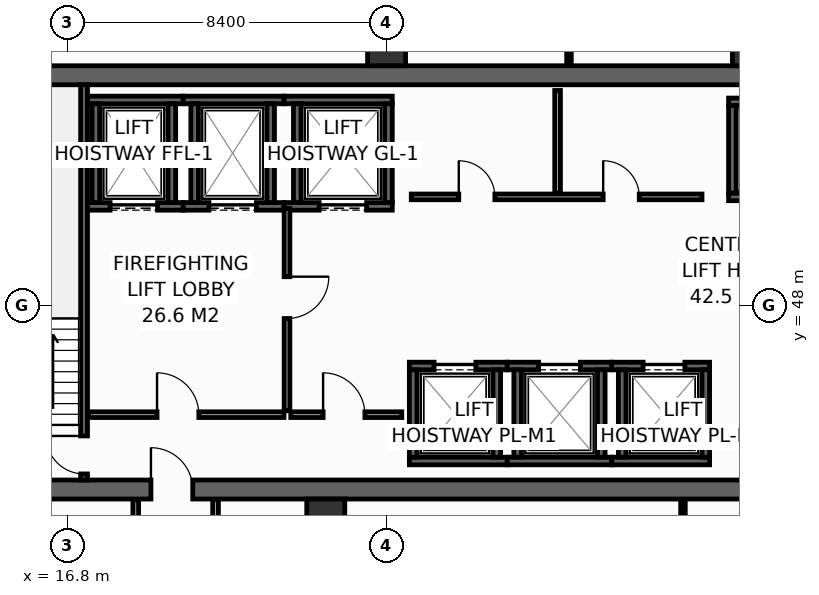
"""IFC4 building model, lengths in metres.
Left out: names, types, materials, properties, quantities, classifications, styles, units other than length and angle.
Written with IfcOpenShell. Run it as: python <this file> out.ifc"""

import sys

from ifc_helpers import new_model, si_unit, direction, frame, frame_2d, origin, origin_2d, place, context, subcontext, project, spatial, rectangle, hollow_rectangle, extrude, element, fill, save


model = new_model("IFC4")
c1 = context("Model", 3, precision=1e-05, world=origin(), true_north=direction((0.0, 1.0)))
c2 = subcontext(c1, "Body", "Model", "MODEL_VIEW")
j1 = project(units=[si_unit("LENGTHUNIT", "METRE"), si_unit("PLANEANGLEUNIT", "RADIAN")], contexts=[c1])
p1 = place(None, origin())
s1 = spatial("IfcSite", under=j1, at=p1, CompositionType="ELEMENT")
p2 = place(p1, origin())
s2 = spatial("IfcBuilding", under=s1, at=p2, CompositionType="ELEMENT")
p3 = place(p2, frame((0.0, 0.0, 163.8)))
s3 = spatial("IfcBuildingStorey", under=s2, at=p3, CompositionType="ELEMENT", Elevation=163.8)
p4 = place(p3, frame((13.6, 43.15, 0.0), z_axis=(0.0, 0.0, 1.0), x_axis=(1.0, 0.0, 0.0)))
e1 = element("IfcWall", 1, at=p4, inside=s3, PredefinedType="SHEAR", context=c2, shape_type="SweptSolid", body=[
    extrude(rectangle(XDim=32.7, YDim=0.5, at=frame_2d((16.35, 0.0))), origin(), (0.0, 0.0, 1.0), 3.55),
])
p5 = place(p4, frame((5.4, 0.0, 0.0)))
e2 = element("IfcOpeningElement", 2, at=p5, cuts=e1, PredefinedType="OPENING", context=c2, shape_type="SweptSolid", body=[
    extrude(rectangle(XDim=1.1, YDim=2.15, at=frame_2d((0.55, 1.075))), frame((0.0, 0.26, 0.0), z_axis=(0.0, -1.0, 0.0), x_axis=(1.0, 0.0, 0.0)), (0.0, 0.0, 1.0), 0.52),
])
p6 = place(p4, frame((25.6, 0.0, 0.0)))
e3 = element("IfcOpeningElement", 3, at=p6, cuts=e1, PredefinedType="OPENING", context=c2, shape_type="SweptSolid", body=[
    extrude(rectangle(XDim=1.1, YDim=2.15, at=frame_2d((0.55, 1.075))), frame((0.0, 0.26, 0.0), z_axis=(0.0, -1.0, 0.0), x_axis=(1.0, 0.0, 0.0)), (0.0, 0.0, 1.0), 0.52),
])
p7 = place(p3, frame((13.6, 54.05, 0.0), z_axis=(0.0, 0.0, 1.0), x_axis=(1.0, 0.0, 0.0)))
e4 = element("IfcWall", 4, at=p7, inside=s3, PredefinedType="SHEAR", context=c2, shape_type="SweptSolid", body=[
    extrude(rectangle(XDim=32.7, YDim=0.5, at=frame_2d((16.35, 0.0))), origin(), (0.0, 0.0, 1.0), 3.55),
])
for number, where, z_axis, x_axis in (
    (5, (25.2, 54.8, 0.0), (0.0, 0.0, 1.0), (1.0, 0.0, 0.0)),
    (6, (34.8, 54.8, 0.0), (0.0, 0.0, 1.0), (1.0, 0.0, 0.0)),
    (7, (23.6, 42.4, 0.0), (0.0, 0.0, 1.0), (1.0, 0.0, 0.0)),
):
    element("IfcColumn", number, at=place(p3, frame(where, z_axis=z_axis, x_axis=x_axis)), inside=s3, PredefinedType="COLUMN", context=c2, shape_type="SweptSolid", body=[
        extrude(hollow_rectangle(XDim=1.0, YDim=1.0, WallThickness=0.045, at=origin_2d()), origin(), (0.0, 0.0, 1.0), 3.8),
    ])
p8 = place(p3, frame((17.33, 50.6, 0.0), z_axis=(0.0, 0.0, 1.0), x_axis=(1.0, 0.0, 0.0)))
e8 = element("IfcWall", 8, at=p8, inside=s3, PredefinedType="SHEAR", context=c2, shape_type="SweptSolid", body=[
    extrude(rectangle(XDim=2.52, YDim=0.2, at=frame_2d((1.26, 0.0))), origin(), (0.0, 0.0, 1.0), 3.55),
])
p9 = place(p8, frame((0.595, 0.0, 0.0)))
e9 = element("IfcOpeningElement", 9, at=p9, cuts=e8, PredefinedType="OPENING", context=c2, shape_type="SweptSolid", body=[
    extrude(rectangle(XDim=1.25, YDim=2.3, at=frame_2d((0.625, 1.15))), frame((0.0, 0.11, 0.0), z_axis=(0.0, -1.0, 0.0), x_axis=(1.0, 0.0, 0.0)), (0.0, 0.0, 1.0), 0.22),
])
p10 = place(p3, frame((17.33, 53.4, 0.0), z_axis=(0.0, 0.0, 1.0), x_axis=(1.0, 0.0, 0.0)))
e10 = element("IfcWall", 10, at=p10, inside=s3, PredefinedType="SHEAR", context=c2, shape_type="SweptSolid", body=[
    extrude(rectangle(XDim=2.52, YDim=0.2, at=frame_2d((1.26, 0.0))), origin(), (0.0, 0.0, 1.0), 3.55),
])
for number, where, z_axis, x_axis in (
    (11, (17.55, 50.7, 0.0), (0.0, 0.0, 1.0), (0.0, 1.0, 0.0)),
    (12, (19.55, 50.7, 0.0), (0.0, 0.0, 1.0), (0.0, 1.0, 0.0)),
):
    element("IfcWall", number, at=place(p3, frame(where, z_axis=z_axis, x_axis=x_axis)), inside=s3, PredefinedType="SHEAR", context=c2, shape_type="SweptSolid", body=[
        extrude(rectangle(XDim=2.6, YDim=0.2, at=frame_2d((1.3, 0.0))), origin(), (0.0, 0.0, 1.0), 3.55),
    ])
p11 = place(p3, frame((19.85, 50.6, 0.0), z_axis=(0.0, 0.0, 1.0), x_axis=(1.0, 0.0, 0.0)))
e13 = element("IfcWall", 13, at=p11, inside=s3, PredefinedType="SHEAR", context=c2, shape_type="SweptSolid", body=[
    extrude(rectangle(XDim=2.65, YDim=0.2, at=frame_2d((1.325, 0.0))), origin(), (0.0, 0.0, 1.0), 3.55),
])
p12 = place(p11, frame((0.675, 0.0, 0.0)))
e14 = element("IfcOpeningElement", 14, at=p12, cuts=e13, PredefinedType="OPENING", context=c2, shape_type="SweptSolid", body=[
    extrude(rectangle(XDim=1.25, YDim=2.3, at=frame_2d((0.625, 1.15))), frame((0.0, 0.11, 0.0), z_axis=(0.0, -1.0, 0.0), x_axis=(1.0, 0.0, 0.0)), (0.0, 0.0, 1.0), 0.22),
])
p13 = place(p3, frame((19.85, 53.4, 0.0), z_axis=(0.0, 0.0, 1.0), x_axis=(1.0, 0.0, 0.0)))
e15 = element("IfcWall", 15, at=p13, inside=s3, PredefinedType="SHEAR", context=c2, shape_type="SweptSolid", body=[
    extrude(rectangle(XDim=2.65, YDim=0.2, at=frame_2d((1.325, 0.0))), origin(), (0.0, 0.0, 1.0), 3.55),
])
for number, where, z_axis, x_axis in (
    (16, (20.15, 50.7, 0.0), (0.0, 0.0, 1.0), (0.0, 1.0, 0.0)),
    (17, (22.15, 50.7, 0.0), (0.0, 0.0, 1.0), (0.0, 1.0, 0.0)),
):
    element("IfcWall", number, at=place(p3, frame(where, z_axis=z_axis, x_axis=x_axis)), inside=s3, PredefinedType="SHEAR", context=c2, shape_type="SweptSolid", body=[
        extrude(rectangle(XDim=2.6, YDim=0.2, at=frame_2d((1.3, 0.0))), origin(), (0.0, 0.0, 1.0), 3.55),
    ])
p14 = place(p3, frame((22.5, 50.6, 0.0), z_axis=(0.0, 0.0, 1.0), x_axis=(1.0, 0.0, 0.0)))
e18 = element("IfcWall", 18, at=p14, inside=s3, PredefinedType="SHEAR", context=c2, shape_type="SweptSolid", body=[
    extrude(rectangle(XDim=2.85, YDim=0.2, at=frame_2d((1.425, 0.0))), origin(), (0.0, 0.0, 1.0), 3.55),
])
p15 = place(p14, frame((0.925, 0.0, 0.0)))
e19 = element("IfcOpeningElement", 19, at=p15, cuts=e18, PredefinedType="OPENING", context=c2, shape_type="SweptSolid", body=[
    extrude(rectangle(XDim=1.25, YDim=2.3, at=frame_2d((0.625, 1.15))), frame((0.0, 0.11, 0.0), z_axis=(0.0, -1.0, 0.0), x_axis=(1.0, 0.0, 0.0)), (0.0, 0.0, 1.0), 0.22),
])
p16 = place(p3, frame((22.5, 53.4, 0.0), z_axis=(0.0, 0.0, 1.0), x_axis=(1.0, 0.0, 0.0)))
e20 = element("IfcWall", 20, at=p16, inside=s3, PredefinedType="SHEAR", context=c2, shape_type="SweptSolid", body=[
    extrude(rectangle(XDim=2.85, YDim=0.2, at=frame_2d((1.425, 0.0))), origin(), (0.0, 0.0, 1.0), 3.55),
])
for number, where, z_axis, x_axis in (
    (21, (22.85, 50.7, 0.0), (0.0, 0.0, 1.0), (0.0, 1.0, 0.0)),
    (22, (25.25, 50.7, 0.0), (0.0, 0.0, 1.0), (0.0, 1.0, 0.0)),
):
    element("IfcWall", number, at=place(p3, frame(where, z_axis=z_axis, x_axis=x_axis)), inside=s3, PredefinedType="SHEAR", context=c2, shape_type="SweptSolid", body=[
        extrude(rectangle(XDim=2.6, YDim=0.2, at=frame_2d((1.3, 0.0))), origin(), (0.0, 0.0, 1.0), 3.55),
    ])
p17 = place(p3, frame((25.8, 43.9, 0.0), z_axis=(0.0, 0.0, 1.0), x_axis=(1.0, 0.0, 0.0)))
e23 = element("IfcWall", 23, at=p17, inside=s3, PredefinedType="SHEAR", context=c2, shape_type="SweptSolid", body=[
    extrude(rectangle(XDim=2.575, YDim=0.2, at=frame_2d((1.288, 0.0))), origin(), (0.0, 0.0, 1.0), 3.55),
])
p18 = place(p3, frame((25.8, 46.4, 0.0), z_axis=(0.0, 0.0, 1.0), x_axis=(1.0, 0.0, 0.0)))
e24 = element("IfcWall", 24, at=p18, inside=s3, PredefinedType="SHEAR", context=c2, shape_type="SweptSolid", body=[
    extrude(rectangle(XDim=2.575, YDim=0.2, at=frame_2d((1.288, 0.0))), origin(), (0.0, 0.0, 1.0), 3.55),
])
p19 = place(p18, frame((0.65, 0.0, 0.0)))
e25 = element("IfcOpeningElement", 25, at=p19, cuts=e24, PredefinedType="OPENING", context=c2, shape_type="SweptSolid", body=[
    extrude(rectangle(XDim=1.1, YDim=2.2, at=frame_2d((0.55, 1.1))), frame((0.0, 0.11, 0.0), z_axis=(0.0, -1.0, 0.0), x_axis=(1.0, 0.0, 0.0)), (0.0, 0.0, 1.0), 0.22),
])
for number, where, z_axis, x_axis in (
    (26, (25.9, 44.0, 0.0), (0.0, 0.0, 1.0), (0.0, 1.0, 0.0)),
    (27, (28.1, 44.0, 0.0), (0.0, 0.0, 1.0), (0.0, 1.0, 0.0)),
):
    element("IfcWall", number, at=place(p3, frame(where, z_axis=z_axis, x_axis=x_axis)), inside=s3, PredefinedType="SHEAR", context=c2, shape_type="SweptSolid", body=[
        extrude(rectangle(XDim=2.3, YDim=0.2, at=frame_2d((1.15, 0.0))), origin(), (0.0, 0.0, 1.0), 3.55),
    ])
p20 = place(p3, frame((28.375, 43.9, 0.0), z_axis=(0.0, 0.0, 1.0), x_axis=(1.0, 0.0, 0.0)))
e28 = element("IfcWall", 28, at=p20, inside=s3, PredefinedType="SHEAR", context=c2, shape_type="SweptSolid", body=[
    extrude(rectangle(XDim=2.75, YDim=0.2, at=frame_2d((1.375, 0.0))), origin(), (0.0, 0.0, 1.0), 3.55),
])
p21 = place(p3, frame((28.375, 46.4, 0.0), z_axis=(0.0, 0.0, 1.0), x_axis=(1.0, 0.0, 0.0)))
e29 = element("IfcWall", 29, at=p21, inside=s3, PredefinedType="SHEAR", context=c2, shape_type="SweptSolid", body=[
    extrude(rectangle(XDim=2.75, YDim=0.2, at=frame_2d((1.375, 0.0))), origin(), (0.0, 0.0, 1.0), 3.55),
])
p22 = place(p21, frame((0.825, 0.0, 0.0)))
e30 = element("IfcOpeningElement", 30, at=p22, cuts=e29, PredefinedType="OPENING", context=c2, shape_type="SweptSolid", body=[
    extrude(rectangle(XDim=1.1, YDim=2.2, at=frame_2d((0.55, 1.1))), frame((0.0, 0.11, 0.0), z_axis=(0.0, -1.0, 0.0), x_axis=(1.0, 0.0, 0.0)), (0.0, 0.0, 1.0), 0.22),
])
for number, where, z_axis, x_axis in (
    (31, (28.65, 44.0, 0.0), (0.0, 0.0, 1.0), (0.0, 1.0, 0.0)),
    (32, (30.85, 44.0, 0.0), (0.0, 0.0, 1.0), (0.0, 1.0, 0.0)),
):
    element("IfcWall", number, at=place(p3, frame(where, z_axis=z_axis, x_axis=x_axis)), inside=s3, PredefinedType="SHEAR", context=c2, shape_type="SweptSolid", body=[
        extrude(rectangle(XDim=2.3, YDim=0.2, at=frame_2d((1.15, 0.0))), origin(), (0.0, 0.0, 1.0), 3.55),
    ])
p23 = place(p3, frame((31.125, 43.9, 0.0), z_axis=(0.0, 0.0, 1.0), x_axis=(1.0, 0.0, 0.0)))
e33 = element("IfcWall", 33, at=p23, inside=s3, PredefinedType="SHEAR", context=c2, shape_type="SweptSolid", body=[
    extrude(rectangle(XDim=2.575, YDim=0.2, at=frame_2d((1.288, 0.0))), origin(), (0.0, 0.0, 1.0), 3.55),
])
p24 = place(p3, frame((31.125, 46.4, 0.0), z_axis=(0.0, 0.0, 1.0), x_axis=(1.0, 0.0, 0.0)))
e34 = element("IfcWall", 34, at=p24, inside=s3, PredefinedType="SHEAR", context=c2, shape_type="SweptSolid", body=[
    extrude(rectangle(XDim=2.575, YDim=0.2, at=frame_2d((1.288, 0.0))), origin(), (0.0, 0.0, 1.0), 3.55),
])
p25 = place(p24, frame((0.825, 0.0, 0.0)))
e35 = element("IfcOpeningElement", 35, at=p25, cuts=e34, PredefinedType="OPENING", context=c2, shape_type="SweptSolid", body=[
    extrude(rectangle(XDim=1.1, YDim=2.2, at=frame_2d((0.55, 1.1))), frame((0.0, 0.11, 0.0), z_axis=(0.0, -1.0, 0.0), x_axis=(1.0, 0.0, 0.0)), (0.0, 0.0, 1.0), 0.22),
])
for number, where, z_axis, x_axis in (
    (36, (31.4, 44.0, 0.0), (0.0, 0.0, 1.0), (0.0, 1.0, 0.0)),
    (37, (33.6, 44.0, 0.0), (0.0, 0.0, 1.0), (0.0, 1.0, 0.0)),
):
    element("IfcWall", number, at=place(p3, frame(where, z_axis=z_axis, x_axis=x_axis)), inside=s3, PredefinedType="SHEAR", context=c2, shape_type="SweptSolid", body=[
        extrude(rectangle(XDim=2.3, YDim=0.2, at=frame_2d((1.15, 0.0))), origin(), (0.0, 0.0, 1.0), 3.55),
    ])
for number, where, z_axis, x_axis in (
    (38, (34.2, 50.85, 0.0), (0.0, 0.0, 1.0), (1.0, 0.0, 0.0)),
    (39, (34.2, 53.35, 0.0), (0.0, 0.0, 1.0), (1.0, 0.0, 0.0)),
):
    element("IfcWall", number, at=place(p3, frame(where, z_axis=z_axis, x_axis=x_axis)), inside=s3, PredefinedType="SHEAR", context=c2, shape_type="SweptSolid", body=[
        extrude(rectangle(XDim=2.575, YDim=0.2, at=frame_2d((1.288, 0.0))), origin(), (0.0, 0.0, 1.0), 3.55),
    ])
p26 = place(p3, frame((34.3, 50.95, 0.0), z_axis=(0.0, 0.0, 1.0), x_axis=(0.0, 1.0, 0.0)))
e40 = element("IfcWall", 40, at=p26, inside=s3, PredefinedType="SHEAR", context=c2, shape_type="SweptSolid", body=[
    extrude(rectangle(XDim=2.3, YDim=0.2, at=frame_2d((1.15, 0.0))), origin(), (0.0, 0.0, 1.0), 3.55),
])
p27 = place(p3, frame((17.24, 43.4, 0.0), z_axis=(0.0, 0.0, 1.0), x_axis=(0.0, 1.0, 0.0)))
e41 = element("IfcWall", 41, at=p27, inside=s3, PredefinedType="SHEAR", context=c2, shape_type="SweptSolid", body=[
    extrude(rectangle(XDim=10.4, YDim=0.18, at=frame_2d((5.2, 0.0))), origin(), (0.0, 0.0, 1.0), 3.55),
])
p28 = place(p27, frame((0.16, 0.0, 0.0)))
e42 = element("IfcOpeningElement", 42, at=p28, cuts=e41, PredefinedType="OPENING", context=c2, shape_type="SweptSolid", body=[
    extrude(rectangle(XDim=1.0, YDim=2.15, at=frame_2d((0.5, 1.075))), frame((0.0, 0.1, 0.0), z_axis=(0.0, -1.0, 0.0), x_axis=(1.0, 0.0, 0.0)), (0.0, 0.0, 1.0), 0.2),
])
p29 = place(p3, frame((17.36, 45.12, 0.0), z_axis=(0.0, 0.0, 1.0), x_axis=(1.0, 0.0, 0.0)))
e43 = element("IfcWall", 43, at=p29, inside=s3, PredefinedType="PARTITIONING", context=c2, shape_type="SweptSolid", body=[
    extrude(rectangle(XDim=5.14, YDim=0.15, at=frame_2d((2.57, 0.0))), origin(), (0.0, 0.0, 1.0), 3.55),
])
p30 = place(p29, frame((1.8, 0.0, 0.0)))
e44 = element("IfcOpeningElement", 44, at=p30, cuts=e43, PredefinedType="OPENING", context=c2, shape_type="SweptSolid", body=[
    extrude(rectangle(XDim=1.1, YDim=2.15, at=frame_2d((0.55, 1.075))), frame((0.0, 0.085, 0.0), z_axis=(0.0, -1.0, 0.0), x_axis=(1.0, 0.0, 0.0)), (0.0, 0.0, 1.0), 0.17),
])
p31 = place(p3, frame((22.58, 50.55, 0.0), z_axis=(0.0, 0.0, 1.0), x_axis=(0.0, -1.0, 0.0)))
e45 = element("IfcWall", 45, at=p31, inside=s3, PredefinedType="PARTITIONING", context=c2, shape_type="SweptSolid", body=[
    extrude(rectangle(XDim=5.33, YDim=0.15, at=frame_2d((2.665, 0.0))), origin(), (0.0, 0.0, 1.0), 3.55),
])
p32 = place(p31, frame((1.8, 0.0, 0.0)))
e46 = element("IfcOpeningElement", 46, at=p32, cuts=e45, PredefinedType="OPENING", context=c2, shape_type="SweptSolid", body=[
    extrude(rectangle(XDim=1.1, YDim=2.15, at=frame_2d((0.55, 1.075))), frame((0.0, 0.085, 0.0), z_axis=(0.0, -1.0, 0.0), x_axis=(1.0, 0.0, 0.0)), (0.0, 0.0, 1.0), 0.17),
])
p33 = place(p3, frame((22.68, 45.12, 0.0), z_axis=(0.0, 0.0, 1.0), x_axis=(1.0, 0.0, 0.0)))
e47 = element("IfcWall", 47, at=p33, inside=s3, PredefinedType="PARTITIONING", context=c2, shape_type="SweptSolid", body=[
    extrude(rectangle(XDim=2.92, YDim=0.15, at=frame_2d((1.46, 0.0))), origin(), (0.0, 0.0, 1.0), 3.55),
])
p34 = place(p33, frame((0.85, 0.0, 0.0)))
e48 = element("IfcOpeningElement", 48, at=p34, cuts=e47, PredefinedType="OPENING", context=c2, shape_type="SweptSolid", body=[
    extrude(rectangle(XDim=1.1, YDim=2.15, at=frame_2d((0.55, 1.075))), frame((0.0, 0.085, 0.0), z_axis=(0.0, -1.0, 0.0), x_axis=(1.0, 0.0, 0.0)), (0.0, 0.0, 1.0), 0.17),
])
p35 = place(p3, frame((25.85, 50.85, 0.0), z_axis=(0.0, 0.0, 1.0), x_axis=(1.0, 0.0, 0.0)))
e49 = element("IfcWall", 49, at=p35, inside=s3, PredefinedType="PARTITIONING", context=c2, shape_type="SweptSolid", body=[
    extrude(rectangle(XDim=7.65, YDim=0.15, at=frame_2d((3.825, 0.0))), origin(), (0.0, 0.0, 1.0), 3.55),
])
p36 = place(p35, frame((1.25, 0.0, 0.0)))
e50 = element("IfcOpeningElement", 50, at=p36, cuts=e49, PredefinedType="OPENING", context=c2, shape_type="SweptSolid", body=[
    extrude(rectangle(XDim=0.95, YDim=2.15, at=frame_2d((0.475, 1.075))), frame((0.0, 0.085, 0.0), z_axis=(0.0, -1.0, 0.0), x_axis=(1.0, 0.0, 0.0)), (0.0, 0.0, 1.0), 0.17),
])
p37 = place(p35, frame((5.05, 0.0, 0.0)))
e51 = element("IfcOpeningElement", 51, at=p37, cuts=e49, PredefinedType="OPENING", context=c2, shape_type="SweptSolid", body=[
    extrude(rectangle(XDim=0.95, YDim=2.15, at=frame_2d((0.475, 1.075))), frame((0.0, 0.085, 0.0), z_axis=(0.0, -1.0, 0.0), x_axis=(1.0, 0.0, 0.0)), (0.0, 0.0, 1.0), 0.17),
])
p38 = place(p3, frame((29.7, 50.95, 0.0), z_axis=(0.0, 0.0, 1.0), x_axis=(0.0, 1.0, 0.0)))
e52 = element("IfcWall", 52, at=p38, inside=s3, PredefinedType="PARTITIONING", context=c2, shape_type="SweptSolid", body=[
    extrude(rectangle(XDim=2.7, YDim=0.15, at=frame_2d((1.35, 0.0))), origin(), (0.0, 0.0, 1.0), 3.55),
])
p39 = place(p3, frame((30.0, 54.32, 0.0), z_axis=(0.0, 0.0, 1.0), x_axis=(0.0, 1.0, 0.0)))
e53 = element("IfcWall", 53, at=p39, inside=s3, PredefinedType="PARTITIONING", context=c2, shape_type="SweptSolid", body=[
    extrude(rectangle(XDim=1.675, YDim=0.12, at=frame_2d((0.837, 0.0))), origin(), (0.0, 0.0, 1.0), 2.935),
])
for number, where, z_axis, x_axis in (
    (54, (18.6, 40.85, 0.0), (0.0, 0.0, 1.0), (0.0, 1.0, 0.0)),
    (55, (20.7, 40.85, 0.0), (0.0, 0.0, 1.0), (0.0, 1.0, 0.0)),
):
    element("IfcWall", number, at=place(p3, frame(where, z_axis=z_axis, x_axis=x_axis)), inside=s3, PredefinedType="PARTITIONING", context=c2, shape_type="SweptSolid", body=[
        extrude(rectangle(XDim=2.03, YDim=0.15, at=frame_2d((1.015, 0.0))), origin(), (0.0, 0.0, 1.0), 3.55),
    ])
p40 = place(p3, frame((33.0, 40.85, 0.0), z_axis=(0.0, 0.0, 1.0), x_axis=(0.0, 1.0, 0.0)))
e56 = element("IfcWall", 56, at=p40, inside=s3, PredefinedType="PARTITIONING", context=c2, shape_type="SweptSolid", body=[
    extrude(rectangle(XDim=2.03, YDim=0.12, at=frame_2d((1.015, 0.0))), origin(), (0.0, 0.0, 1.0), 2.835),
])
p41 = place(p9, origin())
e57 = element("IfcDoor", 57, at=p41, inside=s3, OperationType="SLIDING_TO_LEFT", PredefinedType="DOOR", context=c2, shape_type="SweptSolid", body=[
    extrude(rectangle(XDim=1.25, YDim=2.3, at=frame_2d((0.625, 1.15))), frame((0.0, 0.025, 0.0), z_axis=(0.0, -1.0, 0.0), x_axis=(1.0, 0.0, 0.0)), (0.0, 0.0, 1.0), 0.05),
])
fill(e9, e57)
p42 = place(p12, origin())
e58 = element("IfcDoor", 58, at=p42, inside=s3, OperationType="SLIDING_TO_LEFT", PredefinedType="DOOR", context=c2, shape_type="SweptSolid", body=[
    extrude(rectangle(XDim=1.25, YDim=2.3, at=frame_2d((0.625, 1.15))), frame((0.0, 0.025, 0.0), z_axis=(0.0, -1.0, 0.0), x_axis=(1.0, 0.0, 0.0)), (0.0, 0.0, 1.0), 0.05),
])
fill(e14, e58)
p43 = place(p15, origin())
e59 = element("IfcDoor", 59, at=p43, inside=s3, OperationType="SLIDING_TO_LEFT", PredefinedType="DOOR", context=c2, shape_type="SweptSolid", body=[
    extrude(rectangle(XDim=1.25, YDim=2.3, at=frame_2d((0.625, 1.15))), frame((0.0, 0.025, 0.0), z_axis=(0.0, -1.0, 0.0), x_axis=(1.0, 0.0, 0.0)), (0.0, 0.0, 1.0), 0.05),
])
fill(e19, e59)
p44 = place(p19, origin())
e60 = element("IfcDoor", 60, at=p44, inside=s3, OperationType="SLIDING_TO_LEFT", PredefinedType="DOOR", context=c2, shape_type="SweptSolid", body=[
    extrude(rectangle(XDim=1.1, YDim=2.2, at=frame_2d((0.55, 1.1))), frame((0.0, 0.025, 0.0), z_axis=(0.0, -1.0, 0.0), x_axis=(1.0, 0.0, 0.0)), (0.0, 0.0, 1.0), 0.05),
])
fill(e25, e60)
p45 = place(p22, origin())
e61 = element("IfcDoor", 61, at=p45, inside=s3, OperationType="SLIDING_TO_LEFT", PredefinedType="DOOR", context=c2, shape_type="SweptSolid", body=[
    extrude(rectangle(XDim=1.1, YDim=2.2, at=frame_2d((0.55, 1.1))), frame((0.0, 0.025, 0.0), z_axis=(0.0, -1.0, 0.0), x_axis=(1.0, 0.0, 0.0)), (0.0, 0.0, 1.0), 0.05),
])
fill(e30, e61)
p46 = place(p25, origin())
e62 = element("IfcDoor", 62, at=p46, inside=s3, OperationType="SLIDING_TO_LEFT", PredefinedType="DOOR", context=c2, shape_type="SweptSolid", body=[
    extrude(rectangle(XDim=1.1, YDim=2.2, at=frame_2d((0.55, 1.1))), frame((0.0, 0.025, 0.0), z_axis=(0.0, -1.0, 0.0), x_axis=(1.0, 0.0, 0.0)), (0.0, 0.0, 1.0), 0.05),
])
fill(e35, e62)
p47 = place(p28, origin())
e63 = element("IfcDoor", 63, at=p47, inside=s3, OperationType="SINGLE_SWING_RIGHT", PredefinedType="DOOR", context=c2, shape_type="SweptSolid", body=[
    extrude(rectangle(XDim=1.0, YDim=2.15, at=frame_2d((0.5, 1.075))), frame((0.0, 0.025, 0.0), z_axis=(0.0, -1.0, 0.0), x_axis=(1.0, 0.0, 0.0)), (0.0, 0.0, 1.0), 0.05),
])
fill(e42, e63)
p48 = place(p30, origin())
e64 = element("IfcDoor", 64, at=p48, inside=s3, OperationType="SINGLE_SWING_LEFT", PredefinedType="DOOR", context=c2, shape_type="SweptSolid", body=[
    extrude(rectangle(XDim=1.1, YDim=2.15, at=frame_2d((0.55, 1.075))), frame((0.0, 0.025, 0.0), z_axis=(0.0, -1.0, 0.0), x_axis=(1.0, 0.0, 0.0)), (0.0, 0.0, 1.0), 0.05),
])
fill(e44, e64)
p49 = place(p32, origin())
e65 = element("IfcDoor", 65, at=p49, inside=s3, OperationType="SINGLE_SWING_LEFT", PredefinedType="DOOR", context=c2, shape_type="SweptSolid", body=[
    extrude(rectangle(XDim=1.1, YDim=2.15, at=frame_2d((0.55, 1.075))), frame((0.0, 0.025, 0.0), z_axis=(0.0, -1.0, 0.0), x_axis=(1.0, 0.0, 0.0)), (0.0, 0.0, 1.0), 0.05),
])
fill(e46, e65)
p50 = place(p34, origin())
e66 = element("IfcDoor", 66, at=p50, inside=s3, OperationType="SINGLE_SWING_LEFT", PredefinedType="DOOR", context=c2, shape_type="SweptSolid", body=[
    extrude(rectangle(XDim=1.1, YDim=2.15, at=frame_2d((0.55, 1.075))), frame((0.0, 0.025, 0.0), z_axis=(0.0, -1.0, 0.0), x_axis=(1.0, 0.0, 0.0)), (0.0, 0.0, 1.0), 0.05),
])
fill(e48, e66)
p51 = place(p5, origin())
e67 = element("IfcDoor", 67, at=p51, inside=s3, OperationType="SINGLE_SWING_LEFT", PredefinedType="DOOR", context=c2, shape_type="SweptSolid", body=[
    extrude(rectangle(XDim=1.1, YDim=2.15, at=frame_2d((0.55, 1.075))), frame((0.0, 0.025, 0.0), z_axis=(0.0, -1.0, 0.0), x_axis=(1.0, 0.0, 0.0)), (0.0, 0.0, 1.0), 0.05),
])
fill(e2, e67)
p52 = place(p36, origin())
e68 = element("IfcDoor", 68, at=p52, inside=s3, OperationType="SINGLE_SWING_LEFT", PredefinedType="DOOR", context=c2, shape_type="SweptSolid", body=[
    extrude(rectangle(XDim=0.95, YDim=2.15, at=frame_2d((0.475, 1.075))), frame((0.0, 0.025, 0.0), z_axis=(0.0, -1.0, 0.0), x_axis=(1.0, 0.0, 0.0)), (0.0, 0.0, 1.0), 0.05),
])
fill(e50, e68)
p53 = place(p37, origin())
e69 = element("IfcDoor", 69, at=p53, inside=s3, OperationType="SINGLE_SWING_LEFT", PredefinedType="DOOR", context=c2, shape_type="SweptSolid", body=[
    extrude(rectangle(XDim=0.95, YDim=2.15, at=frame_2d((0.475, 1.075))), frame((0.0, 0.025, 0.0), z_axis=(0.0, -1.0, 0.0), x_axis=(1.0, 0.0, 0.0)), (0.0, 0.0, 1.0), 0.05),
])
fill(e51, e69)
save(model, sys.argv[1])
